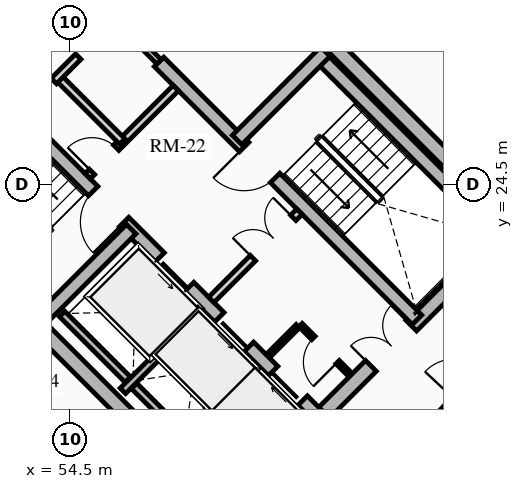
"""IFC4 building model, lengths in metres.
Left out: names, types, materials, properties, quantities, classifications, styles, units other than length and angle.
Written with IfcOpenShell. Run it as: python <this file> out.ifc"""

import sys

from ifc_helpers import new_model, si_unit, direction, frame, frame_2d, origin, place, context, subcontext, project, spatial, rectangle, extrude, source, transform, mapped, element, fill, save


model = new_model("IFC4")
c1 = context("Model", 3, precision=1e-05, world=origin(), true_north=direction((0.0, 1.0)))
c2 = subcontext(c1, "Body", "Model", "MODEL_VIEW")
j1 = project(units=[si_unit("LENGTHUNIT", "METRE"), si_unit("PLANEANGLEUNIT", "RADIAN")], contexts=[c1])
p1 = place(None, origin())
s1 = spatial("IfcSite", under=j1, at=p1, CompositionType="ELEMENT")
p2 = place(p1, origin())
s2 = spatial("IfcBuilding", under=s1, at=p2, CompositionType="ELEMENT")
p3 = place(p2, frame((0.0, 0.0, 174.88)))
s3 = spatial("IfcBuildingStorey", under=s2, at=p3, CompositionType="ELEMENT", Elevation=174.88)
for number, where, z_axis, x_axis in (
    (1, (58.702, 15.732, 0.0), (0.0, 0.0, 1.0), (-0.707, 0.707, 0.0)),
    (2, (66.268, 23.298, 0.0), (0.0, 0.0, 1.0), (-0.707, 0.707, 0.0)),
):
    element("IfcWall", number, at=place(p3, frame(where, z_axis=z_axis, x_axis=x_axis)), inside=s3, PredefinedType="SHEAR", context=c2, shape_type="SweptSolid", body=[
        extrude(rectangle(XDim=14.1, YDim=0.4, at=frame_2d((7.05, 0.0))), origin(), (0.0, 0.0, 1.0), 2.91),
    ])
p4 = place(p3, frame((58.561, 15.873, 0.0), z_axis=(0.0, 0.0, 1.0), x_axis=(0.707106781187, 0.707106781187, 0.0)))
e3 = element("IfcWall", 3, at=p4, inside=s3, PredefinedType="SHEAR", context=c2, shape_type="SweptSolid", body=[
    extrude(rectangle(XDim=10.7, YDim=0.4, at=frame_2d((5.35, 0.0))), origin(), (0.0, 0.0, 1.0), 2.91),
])
m1 = source(origin(), c2, "Body", "SweptSolid", [
    extrude(rectangle(XDim=1.5, YDim=2.02, at=frame_2d((0.75, 1.01))), frame((0.0, 0.21, 0.0), z_axis=(0.0, -1.0, 0.0), x_axis=(1.0, 0.0, 0.0)), (0.0, 0.0, 1.0), 0.42),
])
p5 = place(p4, frame((5.45, 0.0, 0.0)))
e4 = element("IfcOpeningElement", 4, at=p5, cuts=e3, PredefinedType="OPENING", context=c2, shape_type="MappedRepresentation", body=[
    mapped(m1, transform((0.0, 0.0, 0.0), x_axis=(1.0, 0.0, 0.0), y_axis=(0.0, 1.0, 0.0), z_axis=(0.0, 0.0, 1.0), scale=1.0)),
])
p6 = place(p3, frame((48.873, 25.561, 0.0), z_axis=(0.0, 0.0, 1.0), x_axis=(0.707106781187, 0.707106781187, 0.0)))
e5 = element("IfcWall", 5, at=p6, inside=s3, PredefinedType="SHEAR", context=c2, shape_type="SweptSolid", body=[
    extrude(rectangle(XDim=10.7, YDim=0.4, at=frame_2d((5.35, 0.0))), origin(), (0.0, 0.0, 1.0), 2.91),
])
p7 = place(p6, frame((4.6, 0.0, 0.0)))
e6 = element("IfcOpeningElement", 6, at=p7, cuts=e5, PredefinedType="OPENING", context=c2, shape_type="MappedRepresentation", body=[
    mapped(m1, transform((0.0, 0.0, 0.0), x_axis=(1.0, 0.0, 0.0), y_axis=(0.0, 1.0, 0.0), z_axis=(0.0, 0.0, 1.0), scale=1.0)),
])
p8 = place(p3, frame((61.06, 18.373, 0.0), z_axis=(0.0, 0.0, 1.0), x_axis=(-0.707106781187, 0.707106781187, 0.0)))
e7 = element("IfcWall", 7, at=p8, inside=s3, PredefinedType="SHEAR", context=c2, shape_type="SweptSolid", body=[
    extrude(rectangle(XDim=13.7, YDim=0.35, at=frame_2d((6.85, 0.0))), origin(), (0.0, 0.0, 1.0), 2.91),
])
m2 = source(origin(), c2, "Body", "SweptSolid", [
    extrude(rectangle(XDim=1.1, YDim=2.015, at=frame_2d((0.55, 1.007))), frame((0.0, 0.185, 0.0), z_axis=(0.0, -1.0, 0.0), x_axis=(1.0, 0.0, 0.0)), (0.0, 0.0, 1.0), 0.37),
])
p9 = place(p8, frame((4.85, 0.0, 0.0)))
e8 = element("IfcOpeningElement", 8, at=p9, cuts=e7, PredefinedType="OPENING", context=c2, shape_type="MappedRepresentation", body=[
    mapped(m2, transform((0.0, 0.0, 0.0), x_axis=(1.0, 0.0, 0.0), y_axis=(0.0, 1.0, 0.0), z_axis=(0.0, 0.0, 1.0), scale=1.0)),
])
p10 = place(p8, frame((0.625, 0.0, 0.0)))
e9 = element("IfcOpeningElement", 9, at=p10, cuts=e7, PredefinedType="OPENING", context=c2, shape_type="MappedRepresentation", body=[
    mapped(m2, transform((0.0, 0.0, 0.0), x_axis=(1.0, 0.0, 0.0), y_axis=(0.0, 1.0, 0.0), z_axis=(0.0, 0.0, 1.0), scale=1.0)),
])
p11 = place(p8, frame((2.625, 0.0, 0.0)))
e10 = element("IfcOpeningElement", 10, at=p11, cuts=e7, PredefinedType="OPENING", context=c2, shape_type="MappedRepresentation", body=[
    mapped(m2, transform((0.0, 0.0, 0.0), x_axis=(1.0, 0.0, 0.0), y_axis=(0.0, 1.0, 0.0), z_axis=(0.0, 0.0, 1.0), scale=1.0)),
])
m3 = source(origin(), c2, "Body", "SweptSolid", [
    extrude(rectangle(XDim=1.15, YDim=2.02, at=frame_2d((0.575, 1.01))), frame((0.0, 0.185, 0.0), z_axis=(0.0, -1.0, 0.0), x_axis=(1.0, 0.0, 0.0)), (0.0, 0.0, 1.0), 0.37),
])
p12 = place(p8, frame((7.27, 0.0, 0.0)))
e11 = element("IfcOpeningElement", 11, at=p12, cuts=e7, PredefinedType="OPENING", context=c2, shape_type="MappedRepresentation", body=[
    mapped(m3, transform((0.0, 0.0, 0.0), x_axis=(1.0, 0.0, 0.0), y_axis=(0.0, 1.0, 0.0), z_axis=(0.0, 0.0, 1.0), scale=1.0)),
])
p13 = place(p3, frame((63.627, 20.94, 0.0), z_axis=(0.0, 0.0, 1.0), x_axis=(-0.707119496762, 0.707094065383, 0.0)))
e12 = element("IfcWall", 12, at=p13, inside=s3, PredefinedType="SHEAR", context=c2, shape_type="SweptSolid", body=[
    extrude(rectangle(XDim=9.6, YDim=0.35, at=frame_2d((4.8, 0.0))), origin(), (0.0, 0.0, 1.0), 2.91),
])
p14 = place(p13, frame((5.28, 0.0, 0.0)))
e13 = element("IfcOpeningElement", 13, at=p14, cuts=e12, PredefinedType="OPENING", context=c2, shape_type="MappedRepresentation", body=[
    mapped(m3, transform((0.0, 0.0, 0.0), x_axis=(1.0, 0.0, 0.0), y_axis=(0.0, 1.0, 0.0), z_axis=(0.0, 0.0, 1.0), scale=1.0)),
])
p15 = place(p3, frame((53.922, 21.141, 0.0), z_axis=(0.0, 0.0, 1.0), x_axis=(-0.707106781187, 0.707106781187, 0.0)))
e14 = element("IfcWall", 14, at=p15, inside=s3, PredefinedType="SHEAR", context=c2, shape_type="SweptSolid", body=[
    extrude(rectangle(XDim=6.695, YDim=0.35, at=frame_2d((3.348, 0.0))), origin(), (0.0, 0.0, 1.0), 2.91),
])
p16 = place(p3, frame((53.784, 21.003, 0.0), z_axis=(0.0, 0.0, 1.0), x_axis=(0.707106781187, 0.707106781187, 0.0)))
e15 = element("IfcWall", 15, at=p16, inside=s3, PredefinedType="SHEAR", context=c2, shape_type="SweptSolid", body=[
    extrude(rectangle(XDim=3.285, YDim=0.35, at=frame_2d((1.643, 0.0))), origin(), (0.0, 0.0, 1.0), 2.91),
])
p17 = place(p3, frame((65.812, 23.125, 0.0), z_axis=(0.0, 0.0, 1.0), x_axis=(-0.707106781187, 0.707106781187, 0.0)))
e16 = element("IfcWall", 16, at=p17, inside=s3, PredefinedType="SHEAR", context=c2, shape_type="SweptSolid", body=[
    extrude(rectangle(XDim=6.695, YDim=0.35, at=frame_2d((3.348, 0.0))), origin(), (0.0, 0.0, 1.0), 2.91),
])
p18 = place(p3, frame((58.893, 25.674, 0.0), z_axis=(0.0, 0.0, 1.0), x_axis=(0.707106781187, 0.707106781187, 0.0)))
e17 = element("IfcWall", 17, at=p18, inside=s3, PredefinedType="SHEAR", context=c2, shape_type="SweptSolid", body=[
    extrude(rectangle(XDim=3.285, YDim=0.35, at=frame_2d((1.643, 0.0))), origin(), (0.0, 0.0, 1.0), 2.91),
])
p19 = place(p3, frame((55.888, 19.069, 0.0), z_axis=(0.0, 0.0, 1.0), x_axis=(0.707106781187, 0.707106781187, 0.0)))
e18 = element("IfcWall", 18, at=p19, inside=s3, PredefinedType="SHEAR", context=c2, shape_type="SweptSolid", body=[
    extrude(rectangle(XDim=2.97, YDim=0.2, at=frame_2d((1.485, 0.0))), origin(), (0.0, 0.0, 1.0), 2.91),
])
p20 = place(p3, frame((56.015, 19.366, 0.0), z_axis=(0.0, 0.0, 1.0), x_axis=(-0.707106781187, 0.707106781187, 0.0)))
e19 = element("IfcWall", 19, at=p20, inside=s3, PredefinedType="SHEAR", context=c2, shape_type="SweptSolid", body=[
    extrude(rectangle(XDim=2.44, YDim=0.2, at=frame_2d((1.22, 0.0))), origin(), (0.0, 0.0, 1.0), 2.91),
])
p21 = place(p3, frame((57.284, 17.673, 0.0), z_axis=(0.0, 0.0, 1.0), x_axis=(0.707147878904, 0.70706568108, 0.0)))
e20 = element("IfcWall", 20, at=p21, inside=s3, PredefinedType="SHEAR", context=c2, shape_type="SweptSolid", body=[
    extrude(rectangle(XDim=2.97, YDim=0.2, at=frame_2d((1.485, 0.0))), origin(), (0.0, 0.0, 1.0), 2.91),
])
p22 = place(p3, frame((57.412, 17.97, 0.0), z_axis=(0.0, 0.0, 1.0), x_axis=(-0.707106781187, 0.707106781187, 0.0)))
e21 = element("IfcWall", 21, at=p22, inside=s3, PredefinedType="SHEAR", context=c2, shape_type="SweptSolid", body=[
    extrude(rectangle(XDim=1.735, YDim=0.2, at=frame_2d((0.867, 0.0))), origin(), (0.0, 0.0, 1.0), 2.91),
])
p23 = place(p3, frame((58.214, 21.467, 0.0), z_axis=(0.0, 0.0, 1.0), x_axis=(0.707106781187, 0.707106781187, 0.0)))
e22 = element("IfcWall", 22, at=p23, inside=s3, PredefinedType="PARTITIONING", context=c2, shape_type="SweptSolid", body=[
    extrude(rectangle(XDim=3.28, YDim=0.2, at=frame_2d((1.64, 0.0))), origin(), (0.0, 0.0, 1.0), 2.675),
])
m4 = source(origin(), c2, "Body", "SweptSolid", [
    extrude(rectangle(XDim=1.5, YDim=2.02, at=frame_2d((0.75, 1.01))), frame((0.0, 0.11, 0.0), z_axis=(0.0, -1.0, 0.0), x_axis=(1.0, 0.0, 0.0)), (0.0, 0.0, 1.0), 0.22),
])
p24 = place(p23, frame((1.55, 0.0, 0.0)))
e23 = element("IfcOpeningElement", 23, at=p24, cuts=e22, PredefinedType="OPENING", context=c2, shape_type="MappedRepresentation", body=[
    mapped(m4, transform((0.0, 0.0, 0.0), x_axis=(1.0, 0.0, 0.0), y_axis=(0.0, 1.0, 0.0), z_axis=(0.0, 0.0, 1.0), scale=1.0)),
])
p25 = place(p3, frame((54.961, 24.719, 0.0), z_axis=(0.0, 0.0, 1.0), x_axis=(0.707106781187, 0.707106781187, 0.0)))
e24 = element("IfcWall", 24, at=p25, inside=s3, PredefinedType="PARTITIONING", context=c2, shape_type="SweptSolid", body=[
    extrude(rectangle(XDim=3.28, YDim=0.2, at=frame_2d((1.64, 0.0))), origin(), (0.0, 0.0, 1.0), 2.675),
])
m5 = source(origin(), c2, "Body", "SweptSolid", [
    extrude(rectangle(XDim=0.9, YDim=2.005, at=frame_2d((0.45, 1.002))), frame((0.0, 0.11, 0.0), z_axis=(0.0, -1.0, 0.0), x_axis=(1.0, 0.0, 0.0)), (0.0, 0.0, 1.0), 0.22),
])
p26 = place(p25, frame((0.16, 0.0, 0.0)))
e25 = element("IfcOpeningElement", 25, at=p26, cuts=e24, PredefinedType="OPENING", context=c2, shape_type="MappedRepresentation", body=[
    mapped(m5, transform((0.0, 0.0, 0.0), x_axis=(1.0, 0.0, 0.0), y_axis=(0.0, 1.0, 0.0), z_axis=(0.0, 0.0, 1.0), scale=1.0)),
])
p27 = place(p3, frame((55.874, 25.631, 0.0), z_axis=(0.0, 0.0, 1.0), x_axis=(-0.707157639372, 0.707055919343, 0.0)))
e26 = element("IfcWall", 26, at=p27, inside=s3, PredefinedType="PARTITIONING", context=c2, shape_type="SweptSolid", body=[
    extrude(rectangle(XDim=2.4, YDim=0.2, at=frame_2d((1.2, 0.0))), origin(), (0.0, 0.0, 1.0), 2.675),
])
p28 = place(p3, frame((53.264, 26.416, 0.0), z_axis=(0.0, 0.0, 1.0), x_axis=(0.707106781187, 0.707106781187, 0.0)))
e27 = element("IfcWall", 27, at=p28, inside=s3, PredefinedType="PARTITIONING", context=c2, shape_type="SweptSolid", body=[
    extrude(rectangle(XDim=3.28, YDim=0.2, at=frame_2d((1.64, 0.0))), origin(), (0.0, 0.0, 1.0), 2.675),
])
m6 = source(origin(), c2, "Body", "SweptSolid", [
    extrude(rectangle(XDim=1.0, YDim=2.015, at=frame_2d((0.5, 1.007))), frame((0.0, 0.11, 0.0), z_axis=(0.0, -1.0, 0.0), x_axis=(1.0, 0.0, 0.0)), (0.0, 0.0, 1.0), 0.22),
])
p29 = place(p28, frame((0.14, 0.0, 0.0)))
e28 = element("IfcOpeningElement", 28, at=p29, cuts=e27, PredefinedType="OPENING", context=c2, shape_type="MappedRepresentation", body=[
    mapped(m6, transform((0.0, 0.0, 0.0), x_axis=(1.0, 0.0, 0.0), y_axis=(0.0, 1.0, 0.0), z_axis=(0.0, 0.0, 1.0), scale=1.0)),
])
p30 = place(p28, frame((2.05, 0.0, 0.0)))
e29 = element("IfcOpeningElement", 29, at=p30, cuts=e27, PredefinedType="OPENING", context=c2, shape_type="MappedRepresentation", body=[
    mapped(m5, transform((0.0, 0.0, 0.0), x_axis=(1.0, 0.0, 0.0), y_axis=(0.0, 1.0, 0.0), z_axis=(0.0, 0.0, 1.0), scale=1.0)),
])
p31 = place(p3, frame((61.835, 19.529, 0.0), z_axis=(0.0, 0.0, 1.0), x_axis=(-0.707174592913, 0.707038962956, 0.0)))
e30 = element("IfcWall", 30, at=p31, inside=s3, PredefinedType="PARTITIONING", context=c2, shape_type="SweptSolid", body=[
    extrude(rectangle(XDim=1.8, YDim=0.125, at=frame_2d((0.9, 0.0))), origin(), (0.0, 0.0, 1.0), 2.675),
])
m7 = source(origin(), c2, "Body", "SweptSolid", [
    extrude(rectangle(XDim=0.9, YDim=2.005, at=frame_2d((0.45, 1.002))), frame((0.0, 0.073, 0.0), z_axis=(0.0, -1.0, 0.0), x_axis=(1.0, 0.0, 0.0)), (0.0, 0.0, 1.0), 0.145),
])
p32 = place(p31, frame((0.42, 0.0, 0.0)))
e31 = element("IfcOpeningElement", 31, at=p32, cuts=e30, PredefinedType="OPENING", context=c2, shape_type="MappedRepresentation", body=[
    mapped(m7, transform((0.0, 0.0, 0.0), x_axis=(1.0, 0.0, 0.0), y_axis=(0.0, 1.0, 0.0), z_axis=(0.0, 0.0, 1.0), scale=1.0)),
])
p33 = place(p3, frame((59.713, 19.996, 0.0), z_axis=(0.0, 0.0, 1.0), x_axis=(0.707217726, 0.706995818963, 0.0)))
e32 = element("IfcWall", 32, at=p33, inside=s3, PredefinedType="PARTITIONING", context=c2, shape_type="SweptSolid", body=[
    extrude(rectangle(XDim=1.1, YDim=0.125, at=frame_2d((0.55, 0.0))), origin(), (0.0, 0.0, 1.0), 2.675),
])
p34 = place(p3, frame((56.839, 27.728, 0.0), z_axis=(0.0, 0.0, 1.0), x_axis=(-0.707106781187, 0.707106781187, 0.0)))
e33 = element("IfcWall", 33, at=p34, inside=s3, PredefinedType="PARTITIONING", context=c2, shape_type="SweptSolid", body=[
    extrude(rectangle(XDim=3.9, YDim=0.16, at=frame_2d((1.95, 0.0))), origin(), (0.0, 0.0, 1.0), 2.675),
])
m8 = source(origin(), c2, "Body", "SweptSolid", [
    extrude(rectangle(XDim=0.9, YDim=2.005, at=frame_2d((0.45, 1.002))), frame((0.0, 0.09, 0.0), z_axis=(0.0, -1.0, 0.0), x_axis=(1.0, 0.0, 0.0)), (0.0, 0.0, 1.0), 0.18),
])
p35 = place(p34, frame((2.2, 0.0, 0.0)))
e34 = element("IfcOpeningElement", 34, at=p35, cuts=e33, PredefinedType="OPENING", context=c2, shape_type="MappedRepresentation", body=[
    mapped(m8, transform((0.0, 0.0, 0.0), x_axis=(1.0, 0.0, 0.0), y_axis=(0.0, 1.0, 0.0), z_axis=(0.0, 0.0, 1.0), scale=1.0)),
])
p36 = place(p3, frame((52.055, 19.055, 0.0), z_axis=(0.0, 0.0, 1.0), x_axis=(0.699249850691, -0.714877364524, 0.0)))
e35 = element("IfcWall", 35, at=p36, inside=s3, PredefinedType="PARTITIONING", context=c2, shape_type="SweptSolid", body=[
    extrude(rectangle(XDim=5.999, YDim=0.15, at=frame_2d((3.0, 0.0))), origin(), (0.0, 0.0, 1.0), 2.245),
])
p37 = place(p3, frame((62.756, 16.873, 0.0), z_axis=(0.0, 0.0, 1.0), x_axis=(0.682136885079, 0.73122450042, 0.0)))
e36 = element("IfcWall", 36, at=p37, inside=s3, PredefinedType="PARTITIONING", context=c2, shape_type="SweptSolid", body=[
    extrude(rectangle(XDim=6.476, YDim=0.15, at=frame_2d((3.238, 0.0))), origin(), (0.0, 0.0, 1.0), 2.245),
])
m9 = source(origin(), c2, "Body", "SweptSolid", [
    extrude(rectangle(XDim=1.05, YDim=2.015, at=frame_2d((0.525, 1.007))), frame((0.0, 0.085, 0.0), z_axis=(0.0, -1.0, 0.0), x_axis=(1.0, 0.0, 0.0)), (0.0, 0.0, 1.0), 0.17),
])
p38 = place(p37, frame((2.713, 0.0, 0.0)))
e37 = element("IfcOpeningElement", 37, at=p38, cuts=e36, PredefinedType="OPENING", context=c2, shape_type="MappedRepresentation", body=[
    mapped(m9, transform((0.0, 0.0, 0.0), x_axis=(1.0, 0.0, 0.0), y_axis=(0.0, 1.0, 0.0), z_axis=(0.0, 0.0, 1.0), scale=1.0)),
])
m10 = source(origin(), c2, "Body", "SweptSolid", [
    extrude(rectangle(XDim=1.1, YDim=2.015, at=frame_2d((0.55, 1.007))), frame((0.0, 0.025, 0.0), z_axis=(0.0, -1.0, 0.0), x_axis=(1.0, 0.0, 0.0)), (0.0, 0.0, 1.0), 0.05),
])
p39 = place(p9, origin())
e38 = element("IfcDoor", 38, at=p39, inside=s3, OperationType="SLIDING_TO_LEFT", PredefinedType="DOOR", context=c2, shape_type="MappedRepresentation", body=[
    mapped(m10, transform((0.0, 0.0, 0.0), x_axis=(1.0, 0.0, 0.0), y_axis=(0.0, 1.0, 0.0), z_axis=(0.0, 0.0, 1.0), scale=1.0)),
])
fill(e8, e38)
p40 = place(p10, origin())
e39 = element("IfcDoor", 39, at=p40, inside=s3, OperationType="SLIDING_TO_RIGHT", PredefinedType="DOOR", context=c2, shape_type="MappedRepresentation", body=[
    mapped(m10, transform((0.0, 0.0, 0.0), x_axis=(1.0, 0.0, 0.0), y_axis=(0.0, 1.0, 0.0), z_axis=(0.0, 0.0, 1.0), scale=1.0)),
])
fill(e9, e39)
p41 = place(p11, origin())
e40 = element("IfcDoor", 40, at=p41, inside=s3, OperationType="SLIDING_TO_LEFT", PredefinedType="DOOR", context=c2, shape_type="MappedRepresentation", body=[
    mapped(m10, transform((0.0, 0.0, 0.0), x_axis=(1.0, 0.0, 0.0), y_axis=(0.0, 1.0, 0.0), z_axis=(0.0, 0.0, 1.0), scale=1.0)),
])
fill(e10, e40)
m11 = source(origin(), c2, "Body", "SweptSolid", [
    extrude(rectangle(XDim=1.15, YDim=2.02, at=frame_2d((0.575, 1.01))), frame((0.0, 0.025, 0.0), z_axis=(0.0, -1.0, 0.0), x_axis=(1.0, 0.0, 0.0)), (0.0, 0.0, 1.0), 0.05),
])
p42 = place(p12, origin())
e41 = element("IfcDoor", 41, at=p42, inside=s3, OperationType="SINGLE_SWING_LEFT", PredefinedType="DOOR", context=c2, shape_type="MappedRepresentation", body=[
    mapped(m11, transform((0.0, 0.0, 0.0), x_axis=(1.0, 0.0, 0.0), y_axis=(0.0, 1.0, 0.0), z_axis=(0.0, 0.0, 1.0), scale=1.0)),
])
fill(e11, e41)
p43 = place(p14, origin())
e42 = element("IfcDoor", 42, at=p43, inside=s3, OperationType="SINGLE_SWING_RIGHT", PredefinedType="DOOR", context=c2, shape_type="MappedRepresentation", body=[
    mapped(m11, transform((0.0, 0.0, 0.0), x_axis=(1.0, 0.0, 0.0), y_axis=(0.0, 1.0, 0.0), z_axis=(0.0, 0.0, 1.0), scale=1.0)),
])
fill(e13, e42)
m12 = source(origin(), c2, "Body", "SweptSolid", [
    extrude(rectangle(XDim=1.5, YDim=2.02, at=frame_2d((0.75, 1.01))), frame((0.0, 0.025, 0.0), z_axis=(0.0, -1.0, 0.0), x_axis=(1.0, 0.0, 0.0)), (0.0, 0.0, 1.0), 0.05),
])
p44 = place(p5, origin())
e43 = element("IfcDoor", 43, at=p44, inside=s3, OperationType="DOUBLE_DOOR_SINGLE_SWING", PredefinedType="DOOR", context=c2, shape_type="MappedRepresentation", body=[
    mapped(m12, transform((0.0, 0.0, 0.0), x_axis=(1.0, 0.0, 0.0), y_axis=(0.0, 1.0, 0.0), z_axis=(0.0, 0.0, 1.0), scale=1.0)),
])
fill(e4, e43)
p45 = place(p24, origin())
e44 = element("IfcDoor", 44, at=p45, inside=s3, OperationType="DOUBLE_DOOR_SINGLE_SWING", PredefinedType="DOOR", context=c2, shape_type="MappedRepresentation", body=[
    mapped(m12, transform((0.0, 0.0, 0.0), x_axis=(1.0, 0.0, 0.0), y_axis=(0.0, 1.0, 0.0), z_axis=(0.0, 0.0, 1.0), scale=1.0)),
])
fill(e23, e44)
m13 = source(origin(), c2, "Body", "SweptSolid", [
    extrude(rectangle(XDim=0.9, YDim=2.005, at=frame_2d((0.45, 1.002))), frame((0.0, 0.025, 0.0), z_axis=(0.0, -1.0, 0.0), x_axis=(1.0, 0.0, 0.0)), (0.0, 0.0, 1.0), 0.05),
])
p46 = place(p26, origin())
e45 = element("IfcDoor", 45, at=p46, inside=s3, OperationType="SINGLE_SWING_LEFT", PredefinedType="DOOR", context=c2, shape_type="MappedRepresentation", body=[
    mapped(m13, transform((0.0, 0.0, 0.0), x_axis=(1.0, 0.0, 0.0), y_axis=(0.0, 1.0, 0.0), z_axis=(0.0, 0.0, 1.0), scale=1.0)),
])
fill(e25, e45)
m14 = source(origin(), c2, "Body", "SweptSolid", [
    extrude(rectangle(XDim=1.0, YDim=2.015, at=frame_2d((0.5, 1.007))), frame((0.0, 0.025, 0.0), z_axis=(0.0, -1.0, 0.0), x_axis=(1.0, 0.0, 0.0)), (0.0, 0.0, 1.0), 0.05),
])
p47 = place(p29, origin())
e46 = element("IfcDoor", 46, at=p47, inside=s3, OperationType="SINGLE_SWING_RIGHT", PredefinedType="DOOR", context=c2, shape_type="MappedRepresentation", body=[
    mapped(m14, transform((0.0, 0.0, 0.0), x_axis=(1.0, 0.0, 0.0), y_axis=(0.0, 1.0, 0.0), z_axis=(0.0, 0.0, 1.0), scale=1.0)),
])
fill(e28, e46)
p48 = place(p32, origin())
e47 = element("IfcDoor", 47, at=p48, inside=s3, OperationType="SINGLE_SWING_LEFT", PredefinedType="DOOR", context=c2, shape_type="MappedRepresentation", body=[
    mapped(m13, transform((0.0, 0.0, 0.0), x_axis=(1.0, 0.0, 0.0), y_axis=(0.0, 1.0, 0.0), z_axis=(0.0, 0.0, 1.0), scale=1.0)),
])
fill(e31, e47)
p49 = place(p30, origin())
e48 = element("IfcDoor", 48, at=p49, inside=s3, OperationType="SINGLE_SWING_RIGHT", PredefinedType="DOOR", context=c2, shape_type="MappedRepresentation", body=[
    mapped(m13, transform((0.0, 0.0, 0.0), x_axis=(1.0, 0.0, 0.0), y_axis=(0.0, 1.0, 0.0), z_axis=(0.0, 0.0, 1.0), scale=1.0)),
])
fill(e29, e48)
save(model, sys.argv[1])
